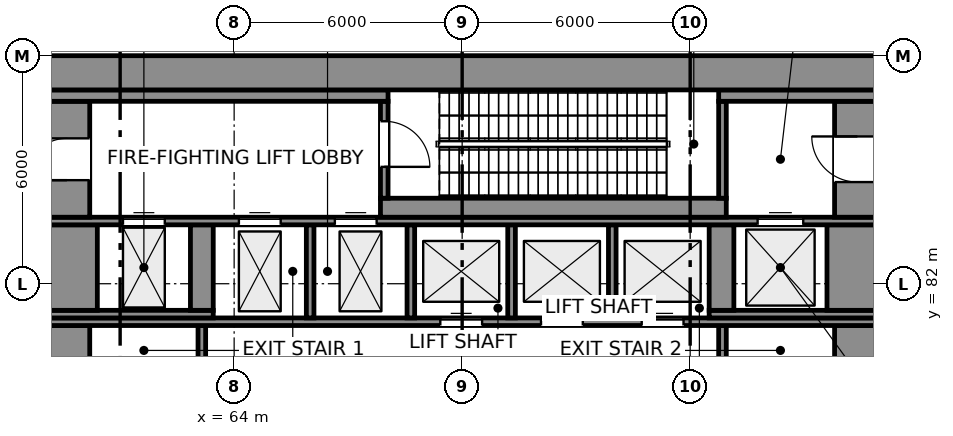
"""IFC4 building model, lengths in metres.
Left out: names, types, materials, properties, quantities, classifications, styles, units other than length and angle.
Written with IfcOpenShell. Run it as: python <this file> out.ifc"""

import sys

from ifc_helpers import new_model, si_unit, direction, frame, frame_2d, origin, place, context, subcontext, project, spatial, rectangle, extrude, element, fill, save


model = new_model("IFC4")
c1 = context("Model", 3, precision=1e-05, world=origin(), true_north=direction((0.0, 1.0)))
c2 = subcontext(c1, "Body", "Model", "MODEL_VIEW")
j1 = project(units=[si_unit("LENGTHUNIT", "METRE"), si_unit("PLANEANGLEUNIT", "RADIAN")], contexts=[c1])
p1 = place(None, origin())
s1 = spatial("IfcSite", under=j1, at=p1, CompositionType="ELEMENT")
p2 = place(p1, origin())
s2 = spatial("IfcBuilding", under=s1, at=p2, CompositionType="ELEMENT")
p3 = place(p2, origin())
s3 = spatial("IfcBuildingStorey", under=s2, at=p3, CompositionType="ELEMENT", Elevation=0.0)
for number, where, z_axis, x_axis in (
    (1, (59.6, 72.2, 0.0), (0.0, 0.0, 1.0), (0.0, 1.0, 0.0)),
    (2, (80.4, 72.2, 0.0), (0.0, 0.0, 1.0), (0.0, 1.0, 0.0)),
):
    element("IfcWall", number, at=place(p3, frame(where, z_axis=z_axis, x_axis=x_axis)), inside=s3, PredefinedType="SHEAR", context=c2, shape_type="SweptSolid", body=[
        extrude(rectangle(XDim=8.7, YDim=1.2, at=frame_2d((4.35, 0.0))), origin(), (0.0, 0.0, 1.0), 9.0),
    ])
for number, where, z_axis, x_axis in (
    (3, (63.15, 77.7, 0.0), (0.0, 0.0, 1.0), (0.0, 1.0, 0.0)),
    (4, (76.85, 77.7, 0.0), (0.0, 0.0, 1.0), (0.0, 1.0, 0.0)),
):
    element("IfcWall", number, at=place(p3, frame(where, z_axis=z_axis, x_axis=x_axis)), inside=s3, PredefinedType="SHEAR", context=c2, shape_type="SweptSolid", body=[
        extrude(rectangle(XDim=3.2, YDim=0.2, at=frame_2d((1.6, 0.0))), origin(), (0.0, 0.0, 1.0), 9.0),
    ])
p4 = place(p3, frame((59.0, 81.0, 0.0), z_axis=(0.0, 0.0, 1.0), x_axis=(1.0, 0.0, 0.0)))
e5 = element("IfcWall", 5, at=p4, inside=s3, PredefinedType="SHEAR", context=c2, shape_type="SweptSolid", body=[
    extrude(rectangle(XDim=22.0, YDim=0.2, at=frame_2d((11.0, 0.0))), origin(), (0.0, 0.0, 1.0), 9.0),
])
p5 = place(p4, frame((10.425, 0.0, 0.0)))
e6 = element("IfcOpeningElement", 6, at=p5, cuts=e5, PredefinedType="OPENING", context=c2, shape_type="SweptSolid", body=[
    extrude(rectangle(XDim=1.1, YDim=2.1, at=frame_2d((0.55, 1.05))), frame((0.0, 0.11, 0.0), z_axis=(0.0, -1.0, 0.0), x_axis=(1.0, 0.0, 0.0)), (0.0, 0.0, 1.0), 0.22),
])
p6 = place(p4, frame((13.075, 0.0, 0.0)))
e7 = element("IfcOpeningElement", 7, at=p6, cuts=e5, PredefinedType="OPENING", context=c2, shape_type="SweptSolid", body=[
    extrude(rectangle(XDim=1.1, YDim=2.1, at=frame_2d((0.55, 1.05))), frame((0.0, 0.11, 0.0), z_axis=(0.0, -1.0, 0.0), x_axis=(1.0, 0.0, 0.0)), (0.0, 0.0, 1.0), 0.22),
])
p7 = place(p4, frame((15.725, 0.0, 0.0)))
e8 = element("IfcOpeningElement", 8, at=p7, cuts=e5, PredefinedType="OPENING", context=c2, shape_type="SweptSolid", body=[
    extrude(rectangle(XDim=1.1, YDim=2.1, at=frame_2d((0.55, 1.05))), frame((0.0, 0.11, 0.0), z_axis=(0.0, -1.0, 0.0), x_axis=(1.0, 0.0, 0.0)), (0.0, 0.0, 1.0), 0.22),
])
p8 = place(p3, frame((59.0, 81.2, 0.0), z_axis=(0.0, 0.0, 1.0), x_axis=(1.0, 0.0, 0.0)))
e9 = element("IfcWall", 9, at=p8, inside=s3, PredefinedType="SHEAR", context=c2, shape_type="SweptSolid", body=[
    extrude(rectangle(XDim=4.45, YDim=0.2, at=frame_2d((2.225, 0.0))), origin(), (0.0, 0.0, 1.0), 9.0),
])
for number, where, z_axis, x_axis in (
    (10, (66.0, 81.1, 0.0), (0.0, 0.0, 1.0), (0.0, 1.0, 0.0)),
    (11, (68.65, 81.1, 0.0), (0.0, 0.0, 1.0), (0.0, 1.0, 0.0)),
    (12, (71.3, 81.1, 0.0), (0.0, 0.0, 1.0), (0.0, 1.0, 0.0)),
    (13, (73.95, 81.1, 0.0), (0.0, 0.0, 1.0), (0.0, 1.0, 0.0)),
):
    element("IfcWall", number, at=place(p3, frame(where, z_axis=z_axis, x_axis=x_axis)), inside=s3, PredefinedType="SHEAR", context=c2, shape_type="SweptSolid", body=[
        extrude(rectangle(XDim=2.45, YDim=0.2, at=frame_2d((1.225, 0.0))), origin(), (0.0, 0.0, 1.0), 9.0),
    ])
p9 = place(p3, frame((76.5, 81.2, 0.0), z_axis=(0.0, 0.0, 1.0), x_axis=(1.0, 0.0, 0.0)))
e14 = element("IfcWall", 14, at=p9, inside=s3, PredefinedType="SHEAR", context=c2, shape_type="SweptSolid", body=[
    extrude(rectangle(XDim=4.5, YDim=0.2, at=frame_2d((2.25, 0.0))), origin(), (0.0, 0.0, 1.0), 9.0),
])
p10 = place(p3, frame((59.7, 81.3, 0.0), z_axis=(0.0, 0.0, 1.0), x_axis=(0.0, 1.0, 0.0)))
e15 = element("IfcWall", 15, at=p10, inside=s3, PredefinedType="SHEAR", context=c2, shape_type="SweptSolid", body=[
    extrude(rectangle(XDim=2.25, YDim=1.4, at=frame_2d((1.125, 0.0))), origin(), (0.0, 0.0, 1.0), 9.0),
])
p11 = place(p3, frame((63.15, 81.3, 0.0), z_axis=(0.0, 0.0, 1.0), x_axis=(0.0, 1.0, 0.0)))
e16 = element("IfcWall", 16, at=p11, inside=s3, PredefinedType="SHEAR", context=c2, shape_type="SweptSolid", body=[
    extrude(rectangle(XDim=2.25, YDim=0.6, at=frame_2d((1.125, 0.0))), origin(), (0.0, 0.0, 1.0), 9.0),
])
p12 = place(p3, frame((76.825, 81.3, 0.0), z_axis=(0.0, 0.0, 1.0), x_axis=(0.0, 1.0, 0.0)))
e17 = element("IfcWall", 17, at=p12, inside=s3, PredefinedType="SHEAR", context=c2, shape_type="SweptSolid", body=[
    extrude(rectangle(XDim=2.25, YDim=0.65, at=frame_2d((1.125, 0.0))), origin(), (0.0, 0.0, 1.0), 9.0),
])
p13 = place(p3, frame((80.3, 81.3, 0.0), z_axis=(0.0, 0.0, 1.0), x_axis=(0.0, 1.0, 0.0)))
e18 = element("IfcWall", 18, at=p13, inside=s3, PredefinedType="SHEAR", context=c2, shape_type="SweptSolid", body=[
    extrude(rectangle(XDim=2.25, YDim=1.4, at=frame_2d((1.125, 0.0))), origin(), (0.0, 0.0, 1.0), 9.0),
])
p14 = place(p3, frame((59.0, 83.65, 0.0), z_axis=(0.0, 0.0, 1.0), x_axis=(1.0, 0.0, 0.0)))
e19 = element("IfcWall", 19, at=p14, inside=s3, PredefinedType="SHEAR", context=c2, shape_type="SweptSolid", body=[
    extrude(rectangle(XDim=22.0, YDim=0.2, at=frame_2d((11.0, 0.0))), origin(), (0.0, 0.0, 1.0), 9.0),
])
p15 = place(p14, frame((5.125, 0.0, 0.0)))
e20 = element("IfcOpeningElement", 20, at=p15, cuts=e19, PredefinedType="OPENING", context=c2, shape_type="SweptSolid", body=[
    extrude(rectangle(XDim=1.1, YDim=2.1, at=frame_2d((0.55, 1.05))), frame((0.0, 0.11, 0.0), z_axis=(0.0, -1.0, 0.0), x_axis=(1.0, 0.0, 0.0)), (0.0, 0.0, 1.0), 0.22),
])
p16 = place(p14, frame((7.65, 0.0, 0.0)))
e21 = element("IfcOpeningElement", 21, at=p16, cuts=e19, PredefinedType="OPENING", context=c2, shape_type="SweptSolid", body=[
    extrude(rectangle(XDim=1.1, YDim=2.1, at=frame_2d((0.55, 1.05))), frame((0.0, 0.11, 0.0), z_axis=(0.0, -1.0, 0.0), x_axis=(1.0, 0.0, 0.0)), (0.0, 0.0, 1.0), 0.22),
])
p17 = place(p14, frame((18.775, 0.0, 0.0)))
e22 = element("IfcOpeningElement", 22, at=p17, cuts=e19, PredefinedType="OPENING", context=c2, shape_type="SweptSolid", body=[
    extrude(rectangle(XDim=1.2, YDim=2.1, at=frame_2d((0.6, 1.05))), frame((0.0, 0.11, 0.0), z_axis=(0.0, -1.0, 0.0), x_axis=(1.0, 0.0, 0.0)), (0.0, 0.0, 1.0), 0.22),
])
p18 = place(p14, frame((2.075, 0.0, 0.0)))
e23 = element("IfcOpeningElement", 23, at=p18, cuts=e19, PredefinedType="OPENING", context=c2, shape_type="SweptSolid", body=[
    extrude(rectangle(XDim=1.1, YDim=2.1, at=frame_2d((0.55, 1.05))), frame((0.0, 0.11, 0.0), z_axis=(0.0, -1.0, 0.0), x_axis=(1.0, 0.0, 0.0)), (0.0, 0.0, 1.0), 0.22),
])
p19 = place(p3, frame((59.6, 83.75, 0.0), z_axis=(0.0, 0.0, 1.0), x_axis=(0.0, 1.0, 0.0)))
e24 = element("IfcWall", 24, at=p19, inside=s3, PredefinedType="SHEAR", context=c2, shape_type="SweptSolid", body=[
    extrude(rectangle(XDim=3.05, YDim=1.2, at=frame_2d((1.525, 0.0))), origin(), (0.0, 0.0, 1.0), 9.0),
])
p20 = place(p19, frame((0.975, 0.0, 0.0)))
e25 = element("IfcOpeningElement", 25, at=p20, cuts=e24, PredefinedType="OPENING", context=c2, shape_type="SweptSolid", body=[
    extrude(rectangle(XDim=1.1, YDim=2.1, at=frame_2d((0.55, 1.05))), frame((0.0, 0.61, 0.0), z_axis=(0.0, -1.0, 0.0), x_axis=(1.0, 0.0, 0.0)), (0.0, 0.0, 1.0), 1.22),
])
p21 = place(p3, frame((67.85, 84.0, 0.0), z_axis=(0.0, 0.0, 1.0), x_axis=(1.0, 0.0, 0.0)))
e26 = element("IfcWall", 26, at=p21, inside=s3, PredefinedType="SHEAR", context=c2, shape_type="SweptSolid", body=[
    extrude(rectangle(XDim=9.1, YDim=0.5, at=frame_2d((4.55, 0.0))), origin(), (0.0, 0.0, 1.0), 9.0),
])
p22 = place(p3, frame((80.4, 83.75, 0.0), z_axis=(0.0, 0.0, 1.0), x_axis=(0.0, 1.0, 0.0)))
e27 = element("IfcWall", 27, at=p22, inside=s3, PredefinedType="SHEAR", context=c2, shape_type="SweptSolid", body=[
    extrude(rectangle(XDim=3.05, YDim=1.2, at=frame_2d((1.525, 0.0))), origin(), (0.0, 0.0, 1.0), 9.0),
])
p23 = place(p22, frame((0.925, 0.0, 0.0)))
e28 = element("IfcOpeningElement", 28, at=p23, cuts=e27, PredefinedType="OPENING", context=c2, shape_type="SweptSolid", body=[
    extrude(rectangle(XDim=1.2, YDim=2.1, at=frame_2d((0.6, 1.05))), frame((0.0, 0.61, 0.0), z_axis=(0.0, -1.0, 0.0), x_axis=(1.0, 0.0, 0.0)), (0.0, 0.0, 1.0), 1.22),
])
p24 = place(p3, frame((67.95, 84.25, 0.0), z_axis=(0.0, 0.0, 1.0), x_axis=(0.0, 1.0, 0.0)))
e29 = element("IfcWall", 29, at=p24, inside=s3, PredefinedType="SHEAR", context=c2, shape_type="SweptSolid", body=[
    extrude(rectangle(XDim=2.55, YDim=0.2, at=frame_2d((1.275, 0.0))), origin(), (0.0, 0.0, 1.0), 9.0),
])
p25 = place(p24, frame((0.825, 0.0, 0.0)))
e30 = element("IfcOpeningElement", 30, at=p25, cuts=e29, PredefinedType="OPENING", context=c2, shape_type="SweptSolid", body=[
    extrude(rectangle(XDim=1.2, YDim=2.1, at=frame_2d((0.6, 1.05))), frame((0.0, 0.11, 0.0), z_axis=(0.0, -1.0, 0.0), x_axis=(1.0, 0.0, 0.0)), (0.0, 0.0, 1.0), 0.22),
])
p26 = place(p3, frame((76.85, 84.25, 0.0), z_axis=(0.0, 0.0, 1.0), x_axis=(0.0, 1.0, 0.0)))
e31 = element("IfcWall", 31, at=p26, inside=s3, PredefinedType="SHEAR", context=c2, shape_type="SweptSolid", body=[
    extrude(rectangle(XDim=2.55, YDim=0.2, at=frame_2d((1.275, 0.0))), origin(), (0.0, 0.0, 1.0), 9.0),
])
p27 = place(p3, frame((59.0, 86.95, 0.0), z_axis=(0.0, 0.0, 1.0), x_axis=(1.0, 0.0, 0.0)))
e32 = element("IfcWall", 32, at=p27, inside=s3, PredefinedType="SHEAR", context=c2, shape_type="SweptSolid", body=[
    extrude(rectangle(XDim=9.05, YDim=0.3, at=frame_2d((4.525, 0.0))), origin(), (0.0, 0.0, 1.0), 9.0),
])
p28 = place(p3, frame((76.75, 86.95, 0.0), z_axis=(0.0, 0.0, 1.0), x_axis=(1.0, 0.0, 0.0)))
e33 = element("IfcWall", 33, at=p28, inside=s3, PredefinedType="SHEAR", context=c2, shape_type="SweptSolid", body=[
    extrude(rectangle(XDim=4.25, YDim=0.3, at=frame_2d((2.125, 0.0))), origin(), (0.0, 0.0, 1.0), 9.0),
])
p29 = place(p3, frame((59.0, 87.55, 0.0), z_axis=(0.0, 0.0, 1.0), x_axis=(1.0, 0.0, 0.0)))
e34 = element("IfcWall", 34, at=p29, inside=s3, PredefinedType="SHEAR", context=c2, shape_type="SweptSolid", body=[
    extrude(rectangle(XDim=22.0, YDim=0.9, at=frame_2d((11.0, 0.0))), origin(), (0.0, 0.0, 1.0), 9.0),
])
p30 = place(p25, frame((1.2, 0.0, 0.0), z_axis=(0.0, 0.0, 1.0), x_axis=(-1.0, 0.0, 0.0)))
e35 = element("IfcDoor", 35, at=p30, inside=s3, OperationType="SINGLE_SWING_RIGHT", PredefinedType="DOOR", context=c2, shape_type="SweptSolid", body=[
    extrude(rectangle(XDim=1.2, YDim=2.1, at=frame_2d((0.6, 1.05))), frame((0.0, 0.025, 0.0), z_axis=(0.0, -1.0, 0.0), x_axis=(1.0, 0.0, 0.0)), (0.0, 0.0, 1.0), 0.05),
])
fill(e30, e35)
p31 = place(p20, origin())
e36 = element("IfcDoor", 36, at=p31, inside=s3, OperationType="SINGLE_SWING_LEFT", PredefinedType="DOOR", context=c2, shape_type="SweptSolid", body=[
    extrude(rectangle(XDim=1.1, YDim=2.1, at=frame_2d((0.55, 1.05))), frame((0.0, 0.025, 0.0), z_axis=(0.0, -1.0, 0.0), x_axis=(1.0, 0.0, 0.0)), (0.0, 0.0, 1.0), 0.05),
])
fill(e25, e36)
p32 = place(p23, origin())
e37 = element("IfcDoor", 37, at=p32, inside=s3, OperationType="SINGLE_SWING_RIGHT", PredefinedType="DOOR", context=c2, shape_type="SweptSolid", body=[
    extrude(rectangle(XDim=1.2, YDim=2.1, at=frame_2d((0.6, 1.05))), frame((0.0, 0.025, 0.0), z_axis=(0.0, -1.0, 0.0), x_axis=(1.0, 0.0, 0.0)), (0.0, 0.0, 1.0), 0.05),
])
fill(e28, e37)
p33 = place(p15, origin())
e38 = element("IfcDoor", 38, at=p33, inside=s3, OperationType="DOUBLE_DOOR_SLIDING", PredefinedType="DOOR", context=c2, shape_type="SweptSolid", body=[
    extrude(rectangle(XDim=1.1, YDim=2.1, at=frame_2d((0.55, 1.05))), frame((0.0, 0.025, 0.0), z_axis=(0.0, -1.0, 0.0), x_axis=(1.0, 0.0, 0.0)), (0.0, 0.0, 1.0), 0.05),
])
fill(e20, e38)
p34 = place(p16, origin())
e39 = element("IfcDoor", 39, at=p34, inside=s3, OperationType="DOUBLE_DOOR_SLIDING", PredefinedType="DOOR", context=c2, shape_type="SweptSolid", body=[
    extrude(rectangle(XDim=1.1, YDim=2.1, at=frame_2d((0.55, 1.05))), frame((0.0, 0.025, 0.0), z_axis=(0.0, -1.0, 0.0), x_axis=(1.0, 0.0, 0.0)), (0.0, 0.0, 1.0), 0.05),
])
fill(e21, e39)
p35 = place(p5, origin())
e40 = element("IfcDoor", 40, at=p35, inside=s3, OperationType="DOUBLE_DOOR_SLIDING", PredefinedType="DOOR", context=c2, shape_type="SweptSolid", body=[
    extrude(rectangle(XDim=1.1, YDim=2.1, at=frame_2d((0.55, 1.05))), frame((0.0, 0.025, 0.0), z_axis=(0.0, -1.0, 0.0), x_axis=(1.0, 0.0, 0.0)), (0.0, 0.0, 1.0), 0.05),
])
fill(e6, e40)
p36 = place(p6, origin())
e41 = element("IfcDoor", 41, at=p36, inside=s3, OperationType="DOUBLE_DOOR_SLIDING", PredefinedType="DOOR", context=c2, shape_type="SweptSolid", body=[
    extrude(rectangle(XDim=1.1, YDim=2.1, at=frame_2d((0.55, 1.05))), frame((0.0, 0.025, 0.0), z_axis=(0.0, -1.0, 0.0), x_axis=(1.0, 0.0, 0.0)), (0.0, 0.0, 1.0), 0.05),
])
fill(e7, e41)
p37 = place(p7, origin())
e42 = element("IfcDoor", 42, at=p37, inside=s3, OperationType="DOUBLE_DOOR_SLIDING", PredefinedType="DOOR", context=c2, shape_type="SweptSolid", body=[
    extrude(rectangle(XDim=1.1, YDim=2.1, at=frame_2d((0.55, 1.05))), frame((0.0, 0.025, 0.0), z_axis=(0.0, -1.0, 0.0), x_axis=(1.0, 0.0, 0.0)), (0.0, 0.0, 1.0), 0.05),
])
fill(e8, e42)
p38 = place(p17, origin())
e43 = element("IfcDoor", 43, at=p38, inside=s3, OperationType="DOUBLE_DOOR_SLIDING", PredefinedType="DOOR", context=c2, shape_type="SweptSolid", body=[
    extrude(rectangle(XDim=1.2, YDim=2.1, at=frame_2d((0.6, 1.05))), frame((0.0, 0.025, 0.0), z_axis=(0.0, -1.0, 0.0), x_axis=(1.0, 0.0, 0.0)), (0.0, 0.0, 1.0), 0.05),
])
fill(e22, e43)
p39 = place(p18, origin())
e44 = element("IfcDoor", 44, at=p39, inside=s3, OperationType="DOUBLE_DOOR_SLIDING", PredefinedType="DOOR", context=c2, shape_type="SweptSolid", body=[
    extrude(rectangle(XDim=1.1, YDim=2.1, at=frame_2d((0.55, 1.05))), frame((0.0, 0.025, 0.0), z_axis=(0.0, -1.0, 0.0), x_axis=(1.0, 0.0, 0.0)), (0.0, 0.0, 1.0), 0.05),
])
fill(e23, e44)
save(model, sys.argv[1])
